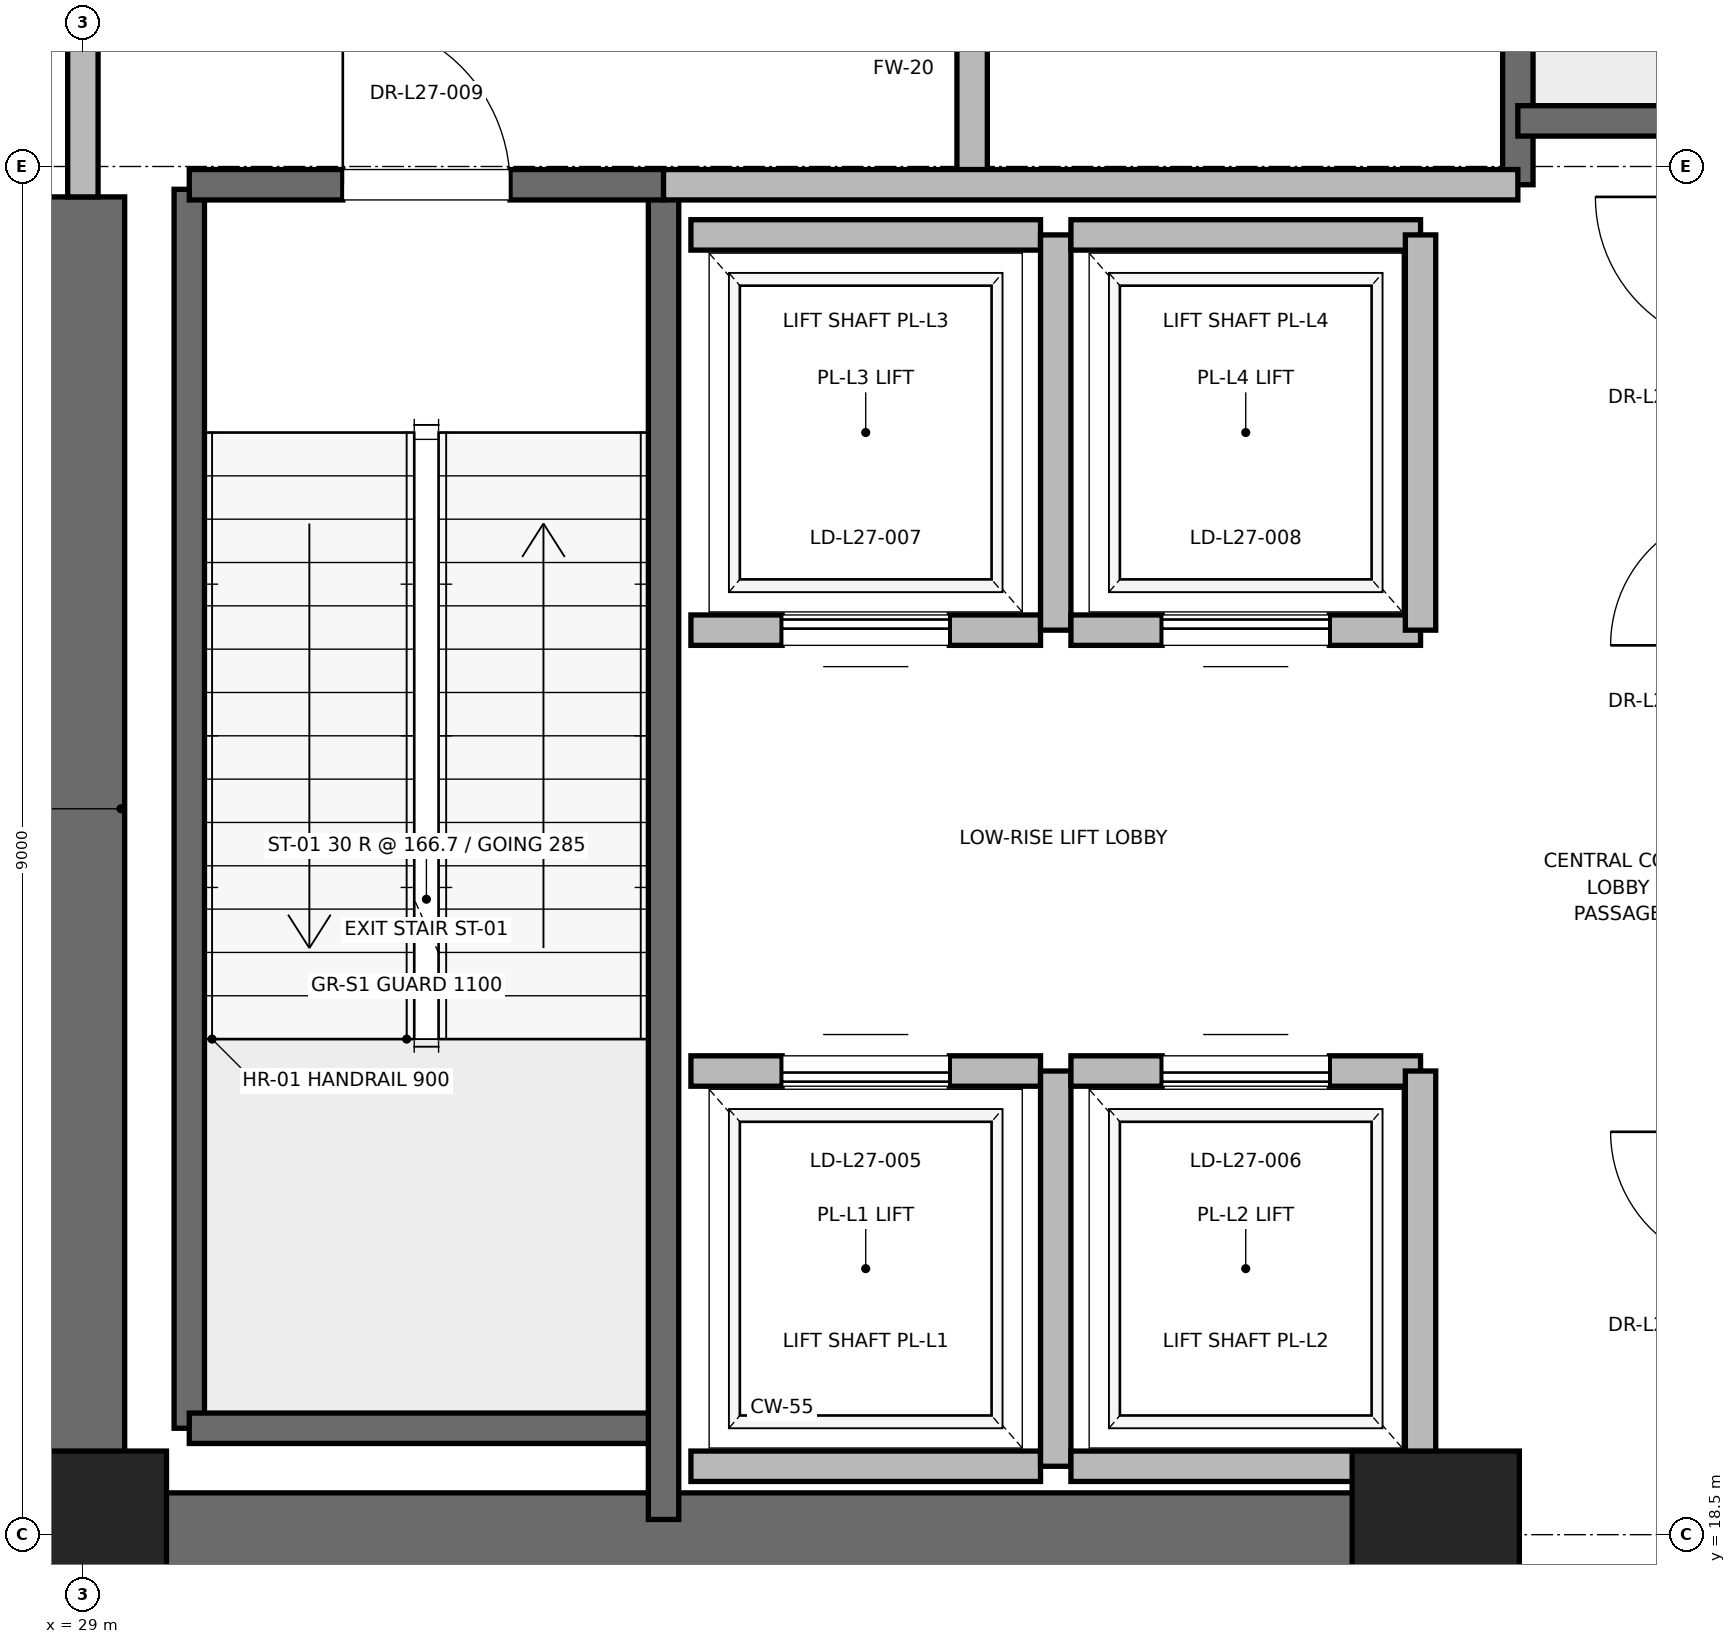
"""IFC4 building model, lengths in metres.
Left out: names, types, materials, properties, quantities, classifications, styles, units other than length and angle.
Written with IfcOpenShell. Run it as: python <this file> out.ifc"""

import sys

from ifc_helpers import new_model, si_unit, direction, frame, frame_2d, origin, origin_2d, place, context, subcontext, project, spatial, rectangle, extrude, element, fill, save


model = new_model("IFC4")
c1 = context("Model", 3, precision=1e-05, world=origin(), true_north=direction((0.0, 1.0)))
c2 = subcontext(c1, "Body", "Model", "MODEL_VIEW")
j1 = project(units=[si_unit("LENGTHUNIT", "METRE"), si_unit("PLANEANGLEUNIT", "RADIAN")], contexts=[c1])
p1 = place(None, origin())
s1 = spatial("IfcSite", under=j1, at=p1, CompositionType="ELEMENT")
p2 = place(p1, origin())
s2 = spatial("IfcBuilding", under=s1, at=p2, CompositionType="ELEMENT")
p3 = place(p2, frame((0.0, 0.0, 118.4)))
s3 = spatial("IfcBuildingStorey", under=s2, at=p3, CompositionType="ELEMENT", Elevation=118.4)
for number, where, z_axis, x_axis in (
    (1, (29.0, 18.5, 0.0), (0.0, 0.0, 1.0), (1.0, 0.0, 0.0)),
    (2, (37.9, 18.5, 0.0), (0.0, 0.0, 1.0), (1.0, 0.0, 0.0)),
):
    element("IfcColumn", number, at=place(p3, frame(where, z_axis=z_axis, x_axis=x_axis)), inside=s3, PredefinedType="PILASTER", context=c2, shape_type="SweptSolid", body=[
        extrude(rectangle(XDim=1.1, YDim=1.1, at=origin_2d()), origin(), (0.0, 0.0, 1.0), 5.0),
    ])
p4 = place(p3, frame((29.0, 18.5, 0.0), z_axis=(0.0, 0.0, 1.0), x_axis=(1.0, 0.0, 0.0)))
e3 = element("IfcWall", 3, at=p4, inside=s3, PredefinedType="SHEAR", context=c2, shape_type="SweptSolid", body=[
    extrude(rectangle(XDim=9.2, YDim=0.55, at=frame_2d((4.6, 0.0))), origin(), (0.0, 0.0, 1.0), 4.7),
])
p5 = place(p3, frame((29.0, 18.5, 0.0), z_axis=(0.0, 0.0, 1.0), x_axis=(0.0, 1.0, 0.0)))
e4 = element("IfcWall", 4, at=p5, inside=s3, PredefinedType="SHEAR", context=c2, shape_type="SweptSolid", body=[
    extrude(rectangle(XDim=8.8, YDim=0.55, at=frame_2d((4.4, 0.0))), origin(), (0.0, 0.0, 1.0), 4.7),
])
p6 = place(p3, frame((29.7, 19.2, 0.0), z_axis=(0.0, 0.0, 1.0), x_axis=(0.0, 1.0, 0.0)))
e5 = element("IfcWall", 5, at=p6, inside=s3, PredefinedType="SOLIDWALL", context=c2, shape_type="SweptSolid", body=[
    extrude(rectangle(XDim=8.15, YDim=0.2, at=frame_2d((4.075, 0.0))), origin(), (0.0, 0.0, 1.0), 4.7),
])
p7 = place(p3, frame((29.7, 19.2, 0.0), z_axis=(0.0, 0.0, 1.0), x_axis=(1.0, 0.0, 0.0)))
e6 = element("IfcWall", 6, at=p7, inside=s3, PredefinedType="SOLIDWALL", context=c2, shape_type="SweptSolid", body=[
    extrude(rectangle(XDim=3.12, YDim=0.2, at=frame_2d((1.56, 0.0))), origin(), (0.0, 0.0, 1.0), 4.7),
])
p8 = place(p3, frame((32.82, 18.6, 0.0), z_axis=(0.0, 0.0, 1.0), x_axis=(0.0, 1.0, 0.0)))
e7 = element("IfcWall", 7, at=p8, inside=s3, PredefinedType="SOLIDWALL", context=c2, shape_type="SweptSolid", body=[
    extrude(rectangle(XDim=8.78, YDim=0.2, at=frame_2d((4.39, 0.0))), origin(), (0.0, 0.0, 1.0), 4.7),
])
p9 = place(p3, frame((29.7, 27.38, 0.0), z_axis=(0.0, 0.0, 1.0), x_axis=(1.0, 0.0, 0.0)))
e8 = element("IfcWall", 8, at=p9, inside=s3, PredefinedType="SOLIDWALL", context=c2, shape_type="SweptSolid", body=[
    extrude(rectangle(XDim=3.12, YDim=0.2, at=frame_2d((1.56, 0.0))), origin(), (0.0, 0.0, 1.0), 4.7),
])
p10 = place(p9, frame((1.01, 0.0, 0.0)))
e9 = element("IfcOpeningElement", 9, at=p10, cuts=e8, PredefinedType="OPENING", context=c2, shape_type="SweptSolid", body=[
    extrude(rectangle(XDim=1.1, YDim=2.15, at=frame_2d((0.55, 1.075))), frame((0.0, 0.1, 0.0), z_axis=(0.0, -1.0, 0.0), x_axis=(1.0, 0.0, 0.0)), (0.0, 0.0, 1.0), 0.2),
])
p11 = place(p3, frame((38.44, 27.38, 0.0), z_axis=(0.0, 0.0, 1.0), x_axis=(0.0, 1.0, 0.0)))
e10 = element("IfcWall", 10, at=p11, inside=s3, PredefinedType="SOLIDWALL", context=c2, shape_type="SweptSolid", body=[
    extrude(rectangle(XDim=8.87, YDim=0.2, at=frame_2d((4.435, 0.0))), origin(), (0.0, 0.0, 1.0), 4.7),
])
p12 = place(p3, frame((38.44, 27.8, 0.0), z_axis=(0.0, 0.0, 1.0), x_axis=(1.0, 0.0, 0.0)))
e11 = element("IfcWall", 11, at=p12, inside=s3, PredefinedType="SOLIDWALL", context=c2, shape_type="SweptSolid", body=[
    extrude(rectangle(XDim=3.32, YDim=0.2, at=frame_2d((1.66, 0.0))), origin(), (0.0, 0.0, 1.0), 4.7),
])
p13 = place(p3, frame((34.85, 27.38, 0.0), z_axis=(0.0, 0.0, 1.0), x_axis=(0.0, 1.0, 0.0)))
e12 = element("IfcWall", 12, at=p13, inside=s3, PredefinedType="PARTITIONING", context=c2, shape_type="SweptSolid", body=[
    extrude(rectangle(XDim=3.37, YDim=0.2, at=frame_2d((1.685, 0.0))), origin(), (0.0, 0.0, 1.0), 4.7),
])
p14 = place(p13, frame((1.11, 0.0, 0.0)))
e13 = element("IfcOpeningElement", 13, at=p14, cuts=e12, PredefinedType="OPENING", context=c2, shape_type="SweptSolid", body=[
    extrude(rectangle(XDim=1.15, YDim=2.2, at=frame_2d((0.575, 1.1))), frame((0.0, 0.1, 0.0), z_axis=(0.0, -1.0, 0.0), x_axis=(1.0, 0.0, 0.0)), (0.0, 0.0, 1.0), 0.2),
])
p15 = place(p3, frame((29.0, 27.3, 0.0), z_axis=(0.0, 0.0, 1.0), x_axis=(0.0, 1.0, 0.0)))
e14 = element("IfcWall", 14, at=p15, inside=s3, PredefinedType="PARTITIONING", context=c2, shape_type="SweptSolid", body=[
    extrude(rectangle(XDim=3.4, YDim=0.2, at=frame_2d((1.7, 0.0))), origin(), (0.0, 0.0, 1.0), 3.68),
])
p16 = place(p15, frame((1.125, 0.0, 0.0)))
e15 = element("IfcOpeningElement", 15, at=p16, cuts=e14, PredefinedType="OPENING", context=c2, shape_type="SweptSolid", body=[
    extrude(rectangle(XDim=1.15, YDim=2.2, at=frame_2d((0.575, 1.1))), frame((0.0, 0.1, 0.0), z_axis=(0.0, -1.0, 0.0), x_axis=(1.0, 0.0, 0.0)), (0.0, 0.0, 1.0), 0.2),
])
p17 = place(p3, frame((32.82, 27.38, 0.0), z_axis=(0.0, 0.0, 1.0), x_axis=(1.0, 0.0, 0.0)))
e16 = element("IfcWall", 16, at=p17, inside=s3, PredefinedType="PARTITIONING", context=c2, shape_type="SweptSolid", body=[
    extrude(rectangle(XDim=5.62, YDim=0.2, at=frame_2d((2.81, 0.0))), origin(), (0.0, 0.0, 1.0), 4.7),
])
p18 = place(p3, frame((33.0, 18.95, 0.0), z_axis=(0.0, 0.0, 1.0), x_axis=(1.0, 0.0, 0.0)))
e17 = element("IfcWall", 17, at=p18, inside=s3, PredefinedType="SOLIDWALL", context=c2, shape_type="SweptSolid", body=[
    extrude(rectangle(XDim=2.3, YDim=0.2, at=frame_2d((1.15, 0.0))), origin(), (0.0, 0.0, 1.0), 4.7),
])
p19 = place(p3, frame((35.3, 21.55, 0.0), z_axis=(0.0, 0.0, 1.0), x_axis=(-1.0, 0.0, 0.0)))
e18 = element("IfcWall", 18, at=p19, inside=s3, PredefinedType="SOLIDWALL", context=c2, shape_type="SweptSolid", body=[
    extrude(rectangle(XDim=2.3, YDim=0.2, at=frame_2d((1.15, 0.0))), origin(), (0.0, 0.0, 1.0), 4.7),
])
p20 = place(p19, frame((0.6, 0.0, 0.0)))
e19 = element("IfcOpeningElement", 19, at=p20, cuts=e18, PredefinedType="OPENING", context=c2, shape_type="SweptSolid", body=[
    extrude(rectangle(XDim=1.1, YDim=2.2, at=frame_2d((0.55, 1.1))), frame((0.0, 0.1, 0.0), z_axis=(0.0, -1.0, 0.0), x_axis=(1.0, 0.0, 0.0)), (0.0, 0.0, 1.0), 0.2),
])
p21 = place(p3, frame((35.4, 18.95, 0.0), z_axis=(0.0, 0.0, 1.0), x_axis=(0.0, 1.0, 0.0)))
e20 = element("IfcWall", 20, at=p21, inside=s3, PredefinedType="SOLIDWALL", context=c2, shape_type="SweptSolid", body=[
    extrude(rectangle(XDim=2.6, YDim=0.2, at=frame_2d((1.3, 0.0))), origin(), (0.0, 0.0, 1.0), 4.7),
])
p22 = place(p3, frame((35.5, 18.95, 0.0), z_axis=(0.0, 0.0, 1.0), x_axis=(1.0, 0.0, 0.0)))
e21 = element("IfcWall", 21, at=p22, inside=s3, PredefinedType="SOLIDWALL", context=c2, shape_type="SweptSolid", body=[
    extrude(rectangle(XDim=2.3, YDim=0.2, at=frame_2d((1.15, 0.0))), origin(), (0.0, 0.0, 1.0), 3.68),
])
p23 = place(p3, frame((37.8, 21.55, 0.0), z_axis=(0.0, 0.0, 1.0), x_axis=(-1.0, 0.0, 0.0)))
e22 = element("IfcWall", 22, at=p23, inside=s3, PredefinedType="SOLIDWALL", context=c2, shape_type="SweptSolid", body=[
    extrude(rectangle(XDim=2.3, YDim=0.2, at=frame_2d((1.15, 0.0))), origin(), (0.0, 0.0, 1.0), 4.7),
])
p24 = place(p23, frame((0.6, 0.0, 0.0)))
e23 = element("IfcOpeningElement", 23, at=p24, cuts=e22, PredefinedType="OPENING", context=c2, shape_type="SweptSolid", body=[
    extrude(rectangle(XDim=1.1, YDim=2.2, at=frame_2d((0.55, 1.1))), frame((0.0, 0.1, 0.0), z_axis=(0.0, -1.0, 0.0), x_axis=(1.0, 0.0, 0.0)), (0.0, 0.0, 1.0), 0.2),
])
p25 = place(p3, frame((37.8, 18.95, 0.0), z_axis=(0.0, 0.0, 1.0), x_axis=(0.0, 1.0, 0.0)))
e24 = element("IfcWall", 24, at=p25, inside=s3, PredefinedType="SOLIDWALL", context=c2, shape_type="SweptSolid", body=[
    extrude(rectangle(XDim=2.6, YDim=0.2, at=frame_2d((1.3, 0.0))), origin(), (0.0, 0.0, 1.0), 3.68),
])
p26 = place(p3, frame((33.0, 24.45, 0.0), z_axis=(0.0, 0.0, 1.0), x_axis=(1.0, 0.0, 0.0)))
e25 = element("IfcWall", 25, at=p26, inside=s3, PredefinedType="SOLIDWALL", context=c2, shape_type="SweptSolid", body=[
    extrude(rectangle(XDim=2.3, YDim=0.2, at=frame_2d((1.15, 0.0))), origin(), (0.0, 0.0, 1.0), 4.7),
])
p27 = place(p26, frame((0.6, 0.0, 0.0)))
e26 = element("IfcOpeningElement", 26, at=p27, cuts=e25, PredefinedType="OPENING", context=c2, shape_type="SweptSolid", body=[
    extrude(rectangle(XDim=1.1, YDim=2.2, at=frame_2d((0.55, 1.1))), frame((0.0, 0.1, 0.0), z_axis=(0.0, -1.0, 0.0), x_axis=(1.0, 0.0, 0.0)), (0.0, 0.0, 1.0), 0.2),
])
p28 = place(p3, frame((35.3, 27.05, 0.0), z_axis=(0.0, 0.0, 1.0), x_axis=(-1.0, 0.0, 0.0)))
e27 = element("IfcWall", 27, at=p28, inside=s3, PredefinedType="SOLIDWALL", context=c2, shape_type="SweptSolid", body=[
    extrude(rectangle(XDim=2.3, YDim=0.2, at=frame_2d((1.15, 0.0))), origin(), (0.0, 0.0, 1.0), 4.7),
])
p29 = place(p3, frame((35.4, 24.45, 0.0), z_axis=(0.0, 0.0, 1.0), x_axis=(0.0, 1.0, 0.0)))
e28 = element("IfcWall", 28, at=p29, inside=s3, PredefinedType="SOLIDWALL", context=c2, shape_type="SweptSolid", body=[
    extrude(rectangle(XDim=2.6, YDim=0.2, at=frame_2d((1.3, 0.0))), origin(), (0.0, 0.0, 1.0), 4.7),
])
p30 = place(p3, frame((35.5, 24.45, 0.0), z_axis=(0.0, 0.0, 1.0), x_axis=(1.0, 0.0, 0.0)))
e29 = element("IfcWall", 29, at=p30, inside=s3, PredefinedType="SOLIDWALL", context=c2, shape_type="SweptSolid", body=[
    extrude(rectangle(XDim=2.3, YDim=0.2, at=frame_2d((1.15, 0.0))), origin(), (0.0, 0.0, 1.0), 4.7),
])
p31 = place(p30, frame((0.6, 0.0, 0.0)))
e30 = element("IfcOpeningElement", 30, at=p31, cuts=e29, PredefinedType="OPENING", context=c2, shape_type="SweptSolid", body=[
    extrude(rectangle(XDim=1.1, YDim=2.2, at=frame_2d((0.55, 1.1))), frame((0.0, 0.1, 0.0), z_axis=(0.0, -1.0, 0.0), x_axis=(1.0, 0.0, 0.0)), (0.0, 0.0, 1.0), 0.2),
])
p32 = place(p3, frame((37.8, 27.05, 0.0), z_axis=(0.0, 0.0, 1.0), x_axis=(-1.0, 0.0, 0.0)))
e31 = element("IfcWall", 31, at=p32, inside=s3, PredefinedType="SOLIDWALL", context=c2, shape_type="SweptSolid", body=[
    extrude(rectangle(XDim=2.3, YDim=0.2, at=frame_2d((1.15, 0.0))), origin(), (0.0, 0.0, 1.0), 4.7),
])
p33 = place(p3, frame((37.8, 24.45, 0.0), z_axis=(0.0, 0.0, 1.0), x_axis=(0.0, 1.0, 0.0)))
e32 = element("IfcWall", 32, at=p33, inside=s3, PredefinedType="SOLIDWALL", context=c2, shape_type="SweptSolid", body=[
    extrude(rectangle(XDim=2.6, YDim=0.2, at=frame_2d((1.3, 0.0))), origin(), (0.0, 0.0, 1.0), 4.7),
])
p34 = place(p10, origin())
e33 = element("IfcDoor", 33, at=p34, inside=s3, OperationType="SINGLE_SWING_LEFT", PredefinedType="DOOR", context=c2, shape_type="SweptSolid", body=[
    extrude(rectangle(XDim=1.1, YDim=2.15, at=frame_2d((0.55, 1.075))), frame((0.0, 0.025, 0.0), z_axis=(0.0, -1.0, 0.0), x_axis=(1.0, 0.0, 0.0)), (0.0, 0.0, 1.0), 0.05),
])
fill(e9, e33)
p35 = place(p20, origin())
e34 = element("IfcDoor", 34, at=p35, inside=s3, OperationType="SLIDING_TO_RIGHT", PredefinedType="DOOR", context=c2, shape_type="SweptSolid", body=[
    extrude(rectangle(XDim=1.1, YDim=2.2, at=frame_2d((0.55, 1.1))), frame((0.0, 0.025, 0.0), z_axis=(0.0, -1.0, 0.0), x_axis=(1.0, 0.0, 0.0)), (0.0, 0.0, 1.0), 0.05),
])
fill(e19, e34)
p36 = place(p24, origin())
e35 = element("IfcDoor", 35, at=p36, inside=s3, OperationType="SLIDING_TO_RIGHT", PredefinedType="DOOR", context=c2, shape_type="SweptSolid", body=[
    extrude(rectangle(XDim=1.1, YDim=2.2, at=frame_2d((0.55, 1.1))), frame((0.0, 0.025, 0.0), z_axis=(0.0, -1.0, 0.0), x_axis=(1.0, 0.0, 0.0)), (0.0, 0.0, 1.0), 0.05),
])
fill(e23, e35)
p37 = place(p27, origin())
e36 = element("IfcDoor", 36, at=p37, inside=s3, OperationType="SLIDING_TO_RIGHT", PredefinedType="DOOR", context=c2, shape_type="SweptSolid", body=[
    extrude(rectangle(XDim=1.1, YDim=2.2, at=frame_2d((0.55, 1.1))), frame((0.0, 0.025, 0.0), z_axis=(0.0, -1.0, 0.0), x_axis=(1.0, 0.0, 0.0)), (0.0, 0.0, 1.0), 0.05),
])
fill(e26, e36)
p38 = place(p31, origin())
e37 = element("IfcDoor", 37, at=p38, inside=s3, OperationType="SLIDING_TO_RIGHT", PredefinedType="DOOR", context=c2, shape_type="SweptSolid", body=[
    extrude(rectangle(XDim=1.1, YDim=2.2, at=frame_2d((0.55, 1.1))), frame((0.0, 0.025, 0.0), z_axis=(0.0, -1.0, 0.0), x_axis=(1.0, 0.0, 0.0)), (0.0, 0.0, 1.0), 0.05),
])
fill(e30, e37)
save(model, sys.argv[1])
